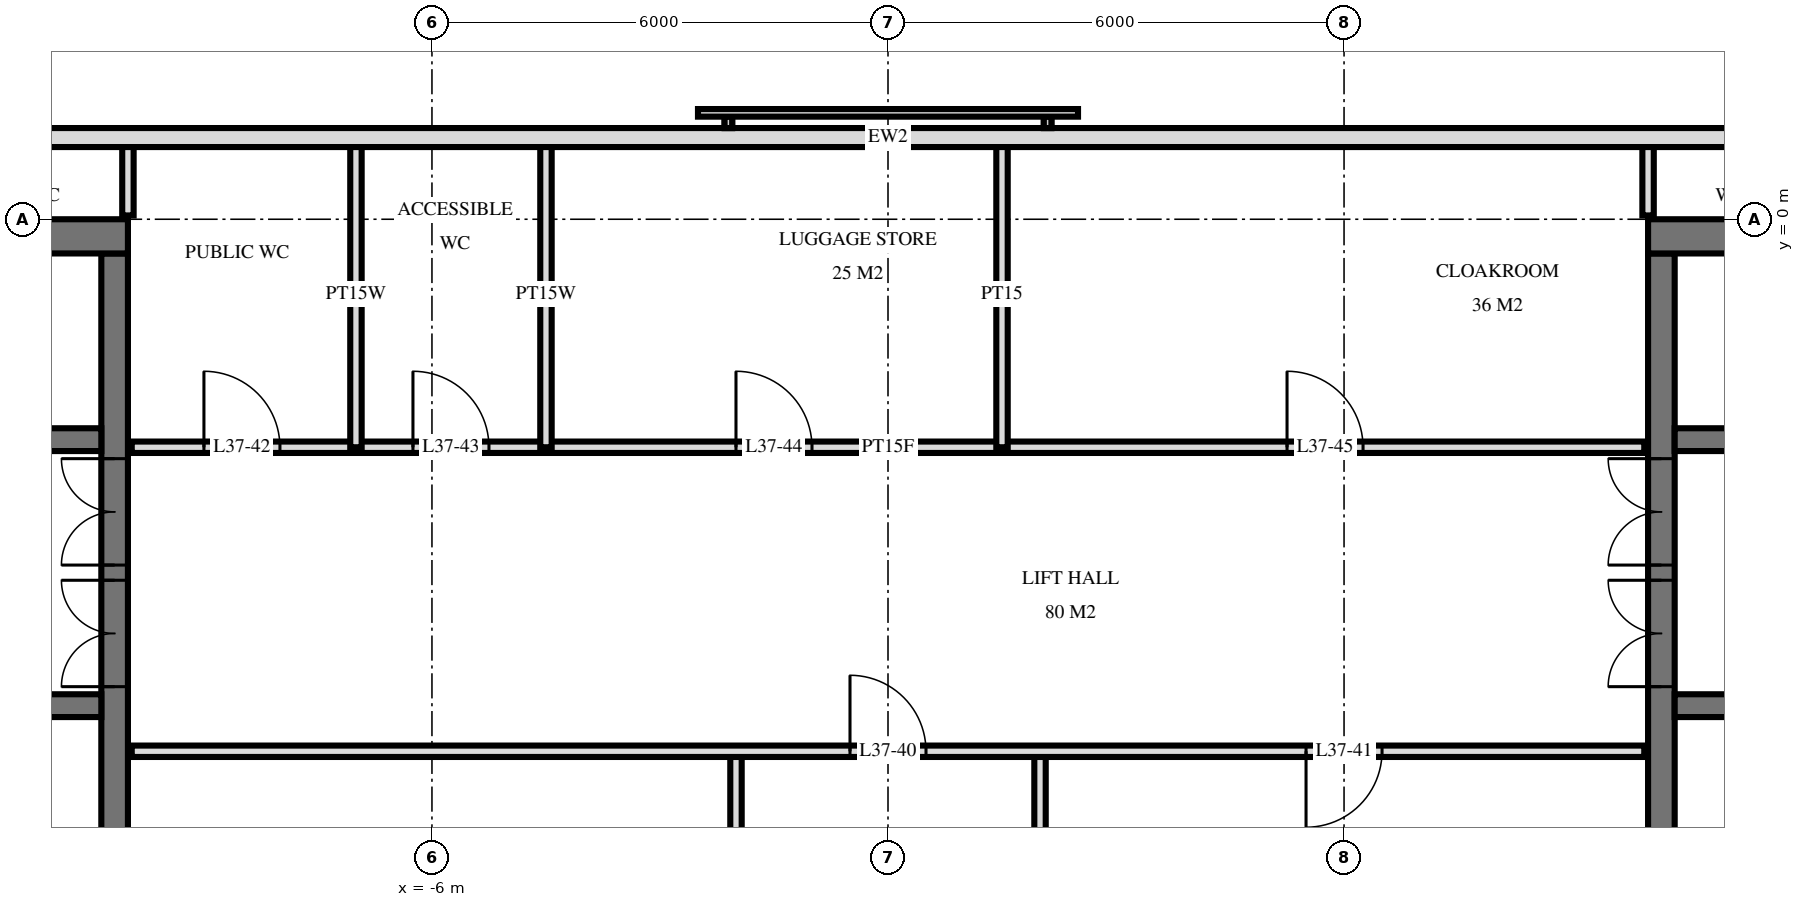
"""IFC4 building model, lengths in metres.
Left out: names, types, materials, properties, quantities, classifications, styles, units other than length and angle.
Written with IfcOpenShell. Run it as: python <this file> out.ifc"""

import sys

from ifc_helpers import new_model, si_unit, direction, frame, frame_2d, origin, place, context, subcontext, project, spatial, rectangle, extrude, element, fill, save


model = new_model("IFC4")
c1 = context("Model", 3, precision=1e-05, world=origin(), true_north=direction((0.0, 1.0)))
c2 = subcontext(c1, "Body", "Model", "MODEL_VIEW")
j1 = project(units=[si_unit("LENGTHUNIT", "METRE"), si_unit("PLANEANGLEUNIT", "RADIAN")], contexts=[c1])
p1 = place(None, origin())
s1 = spatial("IfcSite", under=j1, at=p1, CompositionType="ELEMENT")
p2 = place(p1, origin())
s2 = spatial("IfcBuilding", under=s1, at=p2, CompositionType="ELEMENT")
p3 = place(p2, frame((0.0, 0.0, 145.2)))
s3 = spatial("IfcBuildingStorey", under=s2, at=p3, CompositionType="ELEMENT", Elevation=145.2)
p4 = place(p3, frame((-24.5, -0.225, 0.0), z_axis=(0.0, 0.0, 1.0), x_axis=(1.0, 0.0, 0.0)))
e1 = element("IfcWall", 1, at=p4, inside=s3, PredefinedType="SHEAR", context=c2, shape_type="SweptSolid", body=[
    extrude(rectangle(XDim=14.5, YDim=0.45, at=frame_2d((7.25, 0.0))), origin(), (0.0, 0.0, 1.0), 3.6),
])
p5 = place(p3, frame((-10.175, -14.55, 0.0), z_axis=(0.0, 0.0, 1.0), x_axis=(0.0, 1.0, 0.0)))
e2 = element("IfcWall", 2, at=p5, inside=s3, PredefinedType="SHEAR", context=c2, shape_type="SweptSolid", body=[
    extrude(rectangle(XDim=14.1, YDim=0.35, at=frame_2d((7.05, 0.0))), origin(), (0.0, 0.0, 1.0), 3.6),
])
p6 = place(p5, frame((8.4, 0.0, 0.0)))
e3 = element("IfcOpeningElement", 3, at=p6, cuts=e2, PredefinedType="OPENING", context=c2, shape_type="SweptSolid", body=[
    extrude(rectangle(XDim=1.4, YDim=2.4, at=frame_2d((0.7, 1.2))), frame((0.0, 0.185, 0.0), z_axis=(0.0, -1.0, 0.0), x_axis=(1.0, 0.0, 0.0)), (0.0, 0.0, 1.0), 0.37),
])
p7 = place(p5, frame((10.0, 0.0, 0.0)))
e4 = element("IfcOpeningElement", 4, at=p7, cuts=e2, PredefinedType="OPENING", context=c2, shape_type="SweptSolid", body=[
    extrude(rectangle(XDim=1.4, YDim=2.4, at=frame_2d((0.7, 1.2))), frame((0.0, 0.185, 0.0), z_axis=(0.0, -1.0, 0.0), x_axis=(1.0, 0.0, 0.0)), (0.0, 0.0, 1.0), 0.37),
])
p8 = place(p5, frame((4.0, 0.0, 0.0)))
e5 = element("IfcOpeningElement", 5, at=p8, cuts=e2, PredefinedType="OPENING", context=c2, shape_type="SweptSolid", body=[
    extrude(rectangle(XDim=1.2, YDim=2.1, at=frame_2d((0.6, 1.05))), frame((0.0, 0.185, 0.0), z_axis=(0.0, -1.0, 0.0), x_axis=(1.0, 0.0, 0.0)), (0.0, 0.0, 1.0), 0.37),
])
p9 = place(p3, frame((-24.05, -2.9, 0.0), z_axis=(0.0, 0.0, 1.0), x_axis=(1.0, 0.0, 0.0)))
e6 = element("IfcWall", 6, at=p9, inside=s3, PredefinedType="SHEAR", context=c2, shape_type="SweptSolid", body=[
    extrude(rectangle(XDim=13.7, YDim=0.3, at=frame_2d((6.85, 0.0))), origin(), (0.0, 0.0, 1.0), 3.6),
])
p10 = place(p9, frame((0.55, 0.0, 0.0)))
e7 = element("IfcOpeningElement", 7, at=p10, cuts=e6, PredefinedType="OPENING", context=c2, shape_type="SweptSolid", body=[
    extrude(rectangle(XDim=1.1, YDim=2.1, at=frame_2d((0.55, 1.05))), frame((0.0, 0.16, 0.0), z_axis=(0.0, -1.0, 0.0), x_axis=(1.0, 0.0, 0.0)), (0.0, 0.0, 1.0), 0.32),
])
p11 = place(p9, frame((5.9, 0.0, 0.0)))
e8 = element("IfcOpeningElement", 8, at=p11, cuts=e6, PredefinedType="OPENING", context=c2, shape_type="SweptSolid", body=[
    extrude(rectangle(XDim=0.9, YDim=2.1, at=frame_2d((0.45, 1.05))), frame((0.0, 0.16, 0.0), z_axis=(0.0, -1.0, 0.0), x_axis=(1.0, 0.0, 0.0)), (0.0, 0.0, 1.0), 0.32),
])
p12 = place(p9, frame((11.85, 0.0, 0.0)))
e9 = element("IfcOpeningElement", 9, at=p12, cuts=e6, PredefinedType="OPENING", context=c2, shape_type="SweptSolid", body=[
    extrude(rectangle(XDim=1.0, YDim=2.1, at=frame_2d((0.5, 1.05))), frame((0.0, 0.16, 0.0), z_axis=(0.0, -1.0, 0.0), x_axis=(1.0, 0.0, 0.0)), (0.0, 0.0, 1.0), 0.32),
])
p13 = place(p9, frame((8.85, 0.0, 0.0)))
e10 = element("IfcOpeningElement", 10, at=p13, cuts=e6, PredefinedType="OPENING", context=c2, shape_type="SweptSolid", body=[
    extrude(rectangle(XDim=1.0, YDim=2.1, at=frame_2d((0.5, 1.05))), frame((0.0, 0.16, 0.0), z_axis=(0.0, -1.0, 0.0), x_axis=(1.0, 0.0, 0.0)), (0.0, 0.0, 1.0), 0.32),
])
p14 = place(p9, frame((3.0, 0.0, 0.0)))
e11 = element("IfcOpeningElement", 11, at=p14, cuts=e6, PredefinedType="OPENING", context=c2, shape_type="SweptSolid", body=[
    extrude(rectangle(XDim=1.0, YDim=2.1, at=frame_2d((0.5, 1.05))), frame((0.0, 0.16, 0.0), z_axis=(0.0, -1.0, 0.0), x_axis=(1.0, 0.0, 0.0)), (0.0, 0.0, 1.0), 0.32),
])
p15 = place(p3, frame((-24.05, -6.4, 0.0), z_axis=(0.0, 0.0, 1.0), x_axis=(1.0, 0.0, 0.0)))
e12 = element("IfcWall", 12, at=p15, inside=s3, PredefinedType="SHEAR", context=c2, shape_type="SweptSolid", body=[
    extrude(rectangle(XDim=13.7, YDim=0.3, at=frame_2d((6.85, 0.0))), origin(), (0.0, 0.0, 1.0), 3.6),
])
p16 = place(p15, frame((0.55, 0.0, 0.0)))
e13 = element("IfcOpeningElement", 13, at=p16, cuts=e12, PredefinedType="OPENING", context=c2, shape_type="SweptSolid", body=[
    extrude(rectangle(XDim=1.1, YDim=2.1, at=frame_2d((0.55, 1.05))), frame((0.0, 0.16, 0.0), z_axis=(0.0, -1.0, 0.0), x_axis=(1.0, 0.0, 0.0)), (0.0, 0.0, 1.0), 0.32),
])
p17 = place(p15, frame((5.8, 0.0, 0.0)))
e14 = element("IfcOpeningElement", 14, at=p17, cuts=e12, PredefinedType="OPENING", context=c2, shape_type="SweptSolid", body=[
    extrude(rectangle(XDim=1.1, YDim=2.1, at=frame_2d((0.55, 1.05))), frame((0.0, 0.16, 0.0), z_axis=(0.0, -1.0, 0.0), x_axis=(1.0, 0.0, 0.0)), (0.0, 0.0, 1.0), 0.32),
])
p18 = place(p3, frame((10.0, -0.225, 0.0), z_axis=(0.0, 0.0, 1.0), x_axis=(1.0, 0.0, 0.0)))
e15 = element("IfcWall", 15, at=p18, inside=s3, PredefinedType="SHEAR", context=c2, shape_type="SweptSolid", body=[
    extrude(rectangle(XDim=14.5, YDim=0.45, at=frame_2d((7.25, 0.0))), origin(), (0.0, 0.0, 1.0), 3.6),
])
p19 = place(p3, frame((10.175, -14.55, 0.0), z_axis=(0.0, 0.0, 1.0), x_axis=(0.0, 1.0, 0.0)))
e16 = element("IfcWall", 16, at=p19, inside=s3, PredefinedType="SHEAR", context=c2, shape_type="SweptSolid", body=[
    extrude(rectangle(XDim=14.1, YDim=0.35, at=frame_2d((7.05, 0.0))), origin(), (0.0, 0.0, 1.0), 3.6),
])
p20 = place(p19, frame((8.4, 0.0, 0.0)))
e17 = element("IfcOpeningElement", 17, at=p20, cuts=e16, PredefinedType="OPENING", context=c2, shape_type="SweptSolid", body=[
    extrude(rectangle(XDim=1.4, YDim=2.4, at=frame_2d((0.7, 1.2))), frame((0.0, 0.185, 0.0), z_axis=(0.0, -1.0, 0.0), x_axis=(1.0, 0.0, 0.0)), (0.0, 0.0, 1.0), 0.37),
])
p21 = place(p19, frame((10.0, 0.0, 0.0)))
e18 = element("IfcOpeningElement", 18, at=p21, cuts=e16, PredefinedType="OPENING", context=c2, shape_type="SweptSolid", body=[
    extrude(rectangle(XDim=1.4, YDim=2.4, at=frame_2d((0.7, 1.2))), frame((0.0, 0.185, 0.0), z_axis=(0.0, -1.0, 0.0), x_axis=(1.0, 0.0, 0.0)), (0.0, 0.0, 1.0), 0.37),
])
p22 = place(p19, frame((4.0, 0.0, 0.0)))
e19 = element("IfcOpeningElement", 19, at=p22, cuts=e16, PredefinedType="OPENING", context=c2, shape_type="SweptSolid", body=[
    extrude(rectangle(XDim=1.2, YDim=2.1, at=frame_2d((0.6, 1.05))), frame((0.0, 0.185, 0.0), z_axis=(0.0, -1.0, 0.0), x_axis=(1.0, 0.0, 0.0)), (0.0, 0.0, 1.0), 0.37),
])
p23 = place(p3, frame((10.35, -2.9, 0.0), z_axis=(0.0, 0.0, 1.0), x_axis=(1.0, 0.0, 0.0)))
e20 = element("IfcWall", 20, at=p23, inside=s3, PredefinedType="SHEAR", context=c2, shape_type="SweptSolid", body=[
    extrude(rectangle(XDim=13.7, YDim=0.3, at=frame_2d((6.85, 0.0))), origin(), (0.0, 0.0, 1.0), 3.6),
])
p24 = place(p23, frame((12.05, 0.0, 0.0)))
e21 = element("IfcOpeningElement", 21, at=p24, cuts=e20, PredefinedType="OPENING", context=c2, shape_type="SweptSolid", body=[
    extrude(rectangle(XDim=1.1, YDim=2.1, at=frame_2d((0.55, 1.05))), frame((0.0, 0.16, 0.0), z_axis=(0.0, -1.0, 0.0), x_axis=(1.0, 0.0, 0.0)), (0.0, 0.0, 1.0), 0.32),
])
p25 = place(p23, frame((6.9, 0.0, 0.0)))
e22 = element("IfcOpeningElement", 22, at=p25, cuts=e20, PredefinedType="OPENING", context=c2, shape_type="SweptSolid", body=[
    extrude(rectangle(XDim=0.9, YDim=2.1, at=frame_2d((0.45, 1.05))), frame((0.0, 0.16, 0.0), z_axis=(0.0, -1.0, 0.0), x_axis=(1.0, 0.0, 0.0)), (0.0, 0.0, 1.0), 0.32),
])
p26 = place(p23, frame((0.85, 0.0, 0.0)))
e23 = element("IfcOpeningElement", 23, at=p26, cuts=e20, PredefinedType="OPENING", context=c2, shape_type="SweptSolid", body=[
    extrude(rectangle(XDim=1.0, YDim=2.1, at=frame_2d((0.5, 1.05))), frame((0.0, 0.16, 0.0), z_axis=(0.0, -1.0, 0.0), x_axis=(1.0, 0.0, 0.0)), (0.0, 0.0, 1.0), 0.32),
])
p27 = place(p23, frame((3.85, 0.0, 0.0)))
e24 = element("IfcOpeningElement", 24, at=p27, cuts=e20, PredefinedType="OPENING", context=c2, shape_type="SweptSolid", body=[
    extrude(rectangle(XDim=1.0, YDim=2.1, at=frame_2d((0.5, 1.05))), frame((0.0, 0.16, 0.0), z_axis=(0.0, -1.0, 0.0), x_axis=(1.0, 0.0, 0.0)), (0.0, 0.0, 1.0), 0.32),
])
p28 = place(p23, frame((9.7, 0.0, 0.0)))
e25 = element("IfcOpeningElement", 25, at=p28, cuts=e20, PredefinedType="OPENING", context=c2, shape_type="SweptSolid", body=[
    extrude(rectangle(XDim=1.0, YDim=2.1, at=frame_2d((0.5, 1.05))), frame((0.0, 0.16, 0.0), z_axis=(0.0, -1.0, 0.0), x_axis=(1.0, 0.0, 0.0)), (0.0, 0.0, 1.0), 0.32),
])
p29 = place(p3, frame((10.35, -6.4, 0.0), z_axis=(0.0, 0.0, 1.0), x_axis=(1.0, 0.0, 0.0)))
e26 = element("IfcWall", 26, at=p29, inside=s3, PredefinedType="SHEAR", context=c2, shape_type="SweptSolid", body=[
    extrude(rectangle(XDim=13.7, YDim=0.3, at=frame_2d((6.85, 0.0))), origin(), (0.0, 0.0, 1.0), 3.6),
])
p30 = place(p29, frame((12.05, 0.0, 0.0)))
e27 = element("IfcOpeningElement", 27, at=p30, cuts=e26, PredefinedType="OPENING", context=c2, shape_type="SweptSolid", body=[
    extrude(rectangle(XDim=1.1, YDim=2.1, at=frame_2d((0.55, 1.05))), frame((0.0, 0.16, 0.0), z_axis=(0.0, -1.0, 0.0), x_axis=(1.0, 0.0, 0.0)), (0.0, 0.0, 1.0), 0.32),
])
p31 = place(p29, frame((6.8, 0.0, 0.0)))
e28 = element("IfcOpeningElement", 28, at=p31, cuts=e26, PredefinedType="OPENING", context=c2, shape_type="SweptSolid", body=[
    extrude(rectangle(XDim=1.1, YDim=2.1, at=frame_2d((0.55, 1.05))), frame((0.0, 0.16, 0.0), z_axis=(0.0, -1.0, 0.0), x_axis=(1.0, 0.0, 0.0)), (0.0, 0.0, 1.0), 0.32),
])
p32 = place(p3, frame((23.675, 1.075, 0.0), z_axis=(0.0, 0.0, 1.0), x_axis=(-1.0, 0.0, 0.0)))
e29 = element("IfcWall", 29, at=p32, inside=s3, PredefinedType="SOLIDWALL", context=c2, shape_type="SweptSolid", body=[
    extrude(rectangle(XDim=47.351, YDim=0.25, at=frame_2d((23.675, 0.0))), origin(), (0.0, 0.0, 1.0), 3.32),
])
p33 = place(p3, frame((10.0, 0.05, 0.0), z_axis=(0.0, 0.0, 1.0), x_axis=(0.0, 1.0, 0.0)))
e30 = element("IfcWall", 30, at=p33, inside=s3, PredefinedType="PARTITIONING", context=c2, shape_type="SweptSolid", body=[
    extrude(rectangle(XDim=0.97, YDim=0.15, at=frame_2d((0.485, 0.0))), origin(), (0.0, 0.0, 1.0), 3.32),
])
p34 = place(p3, frame((2.0, -11.0, 0.0), z_axis=(0.0, 0.0, 1.0), x_axis=(0.0, 1.0, 0.0)))
e31 = element("IfcWall", 31, at=p34, inside=s3, PredefinedType="PARTITIONING", context=c2, shape_type="SweptSolid", body=[
    extrude(rectangle(XDim=4.0, YDim=0.15, at=frame_2d((2.0, 0.0))), origin(), (0.0, 0.0, 1.0), 3.32),
])
p35 = place(p3, frame((1.5, -3.0, 0.0), z_axis=(0.0, 0.0, 1.0), x_axis=(0.0, 1.0, 0.0)))
e32 = element("IfcWall", 32, at=p35, inside=s3, PredefinedType="PARTITIONING", context=c2, shape_type="SweptSolid", body=[
    extrude(rectangle(XDim=4.02, YDim=0.15, at=frame_2d((2.01, 0.0))), origin(), (0.0, 0.0, 1.0), 3.32),
])
p36 = place(p3, frame((-2.0, -11.0, 0.0), z_axis=(0.0, 0.0, 1.0), x_axis=(0.0, 1.0, 0.0)))
e33 = element("IfcWall", 33, at=p36, inside=s3, PredefinedType="PARTITIONING", context=c2, shape_type="SweptSolid", body=[
    extrude(rectangle(XDim=4.0, YDim=0.15, at=frame_2d((2.0, 0.0))), origin(), (0.0, 0.0, 1.0), 3.32),
])
for number, where, z_axis, x_axis in (
    (34, (-4.5, -3.0, 0.0), (0.0, 0.0, 1.0), (0.0, 1.0, 0.0)),
    (35, (-7.0, -3.0, 0.0), (0.0, 0.0, 1.0), (0.0, 1.0, 0.0)),
):
    element("IfcWall", number, at=place(p3, frame(where, z_axis=z_axis, x_axis=x_axis)), inside=s3, PredefinedType="PLUMBINGWALL", context=c2, shape_type="SweptSolid", body=[
        extrude(rectangle(XDim=4.02, YDim=0.15, at=frame_2d((2.01, 0.0))), origin(), (0.0, 0.0, 1.0), 3.32),
    ])
p37 = place(p3, frame((-10.0, 0.05, 0.0), z_axis=(0.0, 0.0, 1.0), x_axis=(0.0, 1.0, 0.0)))
e36 = element("IfcWall", 36, at=p37, inside=s3, PredefinedType="PLUMBINGWALL", context=c2, shape_type="SweptSolid", body=[
    extrude(rectangle(XDim=0.97, YDim=0.15, at=frame_2d((0.485, 0.0))), origin(), (0.0, 0.0, 1.0), 3.32),
])
p38 = place(p3, frame((-9.95, -7.0, 0.0), z_axis=(0.0, 0.0, 1.0), x_axis=(1.0, 0.0, 0.0)))
e37 = element("IfcWall", 37, at=p38, inside=s3, PredefinedType="PARTITIONING", context=c2, shape_type="SweptSolid", body=[
    extrude(rectangle(XDim=19.9, YDim=0.15, at=frame_2d((9.95, 0.0))), origin(), (0.0, 0.0, 1.0), 3.32),
])
p39 = place(p38, frame((9.45, 0.0, 0.0)))
e38 = element("IfcOpeningElement", 38, at=p39, cuts=e37, PredefinedType="OPENING", context=c2, shape_type="SweptSolid", body=[
    extrude(rectangle(XDim=1.0, YDim=2.1, at=frame_2d((0.5, 1.05))), frame((0.0, 0.085, 0.0), z_axis=(0.0, -1.0, 0.0), x_axis=(1.0, 0.0, 0.0)), (0.0, 0.0, 1.0), 0.17),
])
p40 = place(p38, frame((15.45, 0.0, 0.0)))
e39 = element("IfcOpeningElement", 39, at=p40, cuts=e37, PredefinedType="OPENING", context=c2, shape_type="SweptSolid", body=[
    extrude(rectangle(XDim=1.0, YDim=2.1, at=frame_2d((0.5, 1.05))), frame((0.0, 0.085, 0.0), z_axis=(0.0, -1.0, 0.0), x_axis=(1.0, 0.0, 0.0)), (0.0, 0.0, 1.0), 0.17),
])
p41 = place(p3, frame((-9.95, -3.0, 0.0), z_axis=(0.0, 0.0, 1.0), x_axis=(1.0, 0.0, 0.0)))
e40 = element("IfcWall", 40, at=p41, inside=s3, PredefinedType="PARTITIONING", context=c2, shape_type="SweptSolid", body=[
    extrude(rectangle(XDim=19.9, YDim=0.15, at=frame_2d((9.95, 0.0))), origin(), (0.0, 0.0, 1.0), 3.32),
])
p42 = place(p41, frame((0.95, 0.0, 0.0)))
e41 = element("IfcOpeningElement", 41, at=p42, cuts=e40, PredefinedType="OPENING", context=c2, shape_type="SweptSolid", body=[
    extrude(rectangle(XDim=1.0, YDim=2.1, at=frame_2d((0.5, 1.05))), frame((0.0, 0.085, 0.0), z_axis=(0.0, -1.0, 0.0), x_axis=(1.0, 0.0, 0.0)), (0.0, 0.0, 1.0), 0.17),
])
p43 = place(p41, frame((3.7, 0.0, 0.0)))
e42 = element("IfcOpeningElement", 42, at=p43, cuts=e40, PredefinedType="OPENING", context=c2, shape_type="SweptSolid", body=[
    extrude(rectangle(XDim=1.0, YDim=2.1, at=frame_2d((0.5, 1.05))), frame((0.0, 0.085, 0.0), z_axis=(0.0, -1.0, 0.0), x_axis=(1.0, 0.0, 0.0)), (0.0, 0.0, 1.0), 0.17),
])
p44 = place(p41, frame((7.95, 0.0, 0.0)))
e43 = element("IfcOpeningElement", 43, at=p44, cuts=e40, PredefinedType="OPENING", context=c2, shape_type="SweptSolid", body=[
    extrude(rectangle(XDim=1.0, YDim=2.1, at=frame_2d((0.5, 1.05))), frame((0.0, 0.085, 0.0), z_axis=(0.0, -1.0, 0.0), x_axis=(1.0, 0.0, 0.0)), (0.0, 0.0, 1.0), 0.17),
])
p45 = place(p41, frame((15.2, 0.0, 0.0)))
e44 = element("IfcOpeningElement", 44, at=p45, cuts=e40, PredefinedType="OPENING", context=c2, shape_type="SweptSolid", body=[
    extrude(rectangle(XDim=1.0, YDim=2.1, at=frame_2d((0.5, 1.05))), frame((0.0, 0.085, 0.0), z_axis=(0.0, -1.0, 0.0), x_axis=(1.0, 0.0, 0.0)), (0.0, 0.0, 1.0), 0.17),
])
p46 = place(p6, origin())
e45 = element("IfcDoor", 45, at=p46, inside=s3, OperationType="DOUBLE_DOOR_SINGLE_SWING", PredefinedType="DOOR", context=c2, shape_type="SweptSolid", body=[
    extrude(rectangle(XDim=1.4, YDim=2.4, at=frame_2d((0.7, 1.2))), frame((0.0, 0.025, 0.0), z_axis=(0.0, -1.0, 0.0), x_axis=(1.0, 0.0, 0.0)), (0.0, 0.0, 1.0), 0.05),
])
fill(e3, e45)
p47 = place(p7, origin())
e46 = element("IfcDoor", 46, at=p47, inside=s3, OperationType="DOUBLE_DOOR_SINGLE_SWING", PredefinedType="DOOR", context=c2, shape_type="SweptSolid", body=[
    extrude(rectangle(XDim=1.4, YDim=2.4, at=frame_2d((0.7, 1.2))), frame((0.0, 0.025, 0.0), z_axis=(0.0, -1.0, 0.0), x_axis=(1.0, 0.0, 0.0)), (0.0, 0.0, 1.0), 0.05),
])
fill(e4, e46)
p48 = place(p20, origin())
e47 = element("IfcDoor", 47, at=p48, inside=s3, OperationType="DOUBLE_DOOR_SINGLE_SWING", PredefinedType="DOOR", context=c2, shape_type="SweptSolid", body=[
    extrude(rectangle(XDim=1.4, YDim=2.4, at=frame_2d((0.7, 1.2))), frame((0.0, 0.025, 0.0), z_axis=(0.0, -1.0, 0.0), x_axis=(1.0, 0.0, 0.0)), (0.0, 0.0, 1.0), 0.05),
])
fill(e17, e47)
p49 = place(p21, origin())
e48 = element("IfcDoor", 48, at=p49, inside=s3, OperationType="DOUBLE_DOOR_SINGLE_SWING", PredefinedType="DOOR", context=c2, shape_type="SweptSolid", body=[
    extrude(rectangle(XDim=1.4, YDim=2.4, at=frame_2d((0.7, 1.2))), frame((0.0, 0.025, 0.0), z_axis=(0.0, -1.0, 0.0), x_axis=(1.0, 0.0, 0.0)), (0.0, 0.0, 1.0), 0.05),
])
fill(e18, e48)
p50 = place(p39, origin())
e49 = element("IfcDoor", 49, at=p50, inside=s3, OperationType="SINGLE_SWING_RIGHT", PredefinedType="DOOR", context=c2, shape_type="SweptSolid", body=[
    extrude(rectangle(XDim=1.0, YDim=2.1, at=frame_2d((0.5, 1.05))), frame((0.0, 0.025, 0.0), z_axis=(0.0, -1.0, 0.0), x_axis=(1.0, 0.0, 0.0)), (0.0, 0.0, 1.0), 0.05),
])
fill(e38, e49)
p51 = place(p40, frame((0.5, 0.0, 0.0), z_axis=(0.0, 0.0, 1.0), x_axis=(-1.0, 0.0, 0.0)))
e50 = element("IfcDoor", 50, at=p51, inside=s3, OperationType="SINGLE_SWING_LEFT", PredefinedType="DOOR", context=c2, shape_type="SweptSolid", body=[
    extrude(rectangle(XDim=1.0, YDim=2.1, at=frame_2d((0.0, 1.05))), frame((0.0, -0.025, 0.0), z_axis=(0.0, 1.0, 0.0), x_axis=(-1.0, 0.0, 0.0)), (0.0, 0.0, 1.0), 0.05),
])
fill(e39, e50)
p52 = place(p42, origin())
e51 = element("IfcDoor", 51, at=p52, inside=s3, OperationType="SINGLE_SWING_RIGHT", PredefinedType="DOOR", context=c2, shape_type="SweptSolid", body=[
    extrude(rectangle(XDim=1.0, YDim=2.1, at=frame_2d((0.5, 1.05))), frame((0.0, 0.025, 0.0), z_axis=(0.0, -1.0, 0.0), x_axis=(1.0, 0.0, 0.0)), (0.0, 0.0, 1.0), 0.05),
])
fill(e41, e51)
p53 = place(p43, origin())
e52 = element("IfcDoor", 52, at=p53, inside=s3, OperationType="SINGLE_SWING_RIGHT", PredefinedType="DOOR", context=c2, shape_type="SweptSolid", body=[
    extrude(rectangle(XDim=1.0, YDim=2.1, at=frame_2d((0.5, 1.05))), frame((0.0, 0.025, 0.0), z_axis=(0.0, -1.0, 0.0), x_axis=(1.0, 0.0, 0.0)), (0.0, 0.0, 1.0), 0.05),
])
fill(e42, e52)
p54 = place(p44, origin())
e53 = element("IfcDoor", 53, at=p54, inside=s3, OperationType="SINGLE_SWING_RIGHT", PredefinedType="DOOR", context=c2, shape_type="SweptSolid", body=[
    extrude(rectangle(XDim=1.0, YDim=2.1, at=frame_2d((0.5, 1.05))), frame((0.0, 0.025, 0.0), z_axis=(0.0, -1.0, 0.0), x_axis=(1.0, 0.0, 0.0)), (0.0, 0.0, 1.0), 0.05),
])
fill(e43, e53)
p55 = place(p45, origin())
e54 = element("IfcDoor", 54, at=p55, inside=s3, OperationType="SINGLE_SWING_RIGHT", PredefinedType="DOOR", context=c2, shape_type="SweptSolid", body=[
    extrude(rectangle(XDim=1.0, YDim=2.1, at=frame_2d((0.5, 1.05))), frame((0.0, 0.025, 0.0), z_axis=(0.0, -1.0, 0.0), x_axis=(1.0, 0.0, 0.0)), (0.0, 0.0, 1.0), 0.05),
])
fill(e44, e54)
save(model, sys.argv[1])
